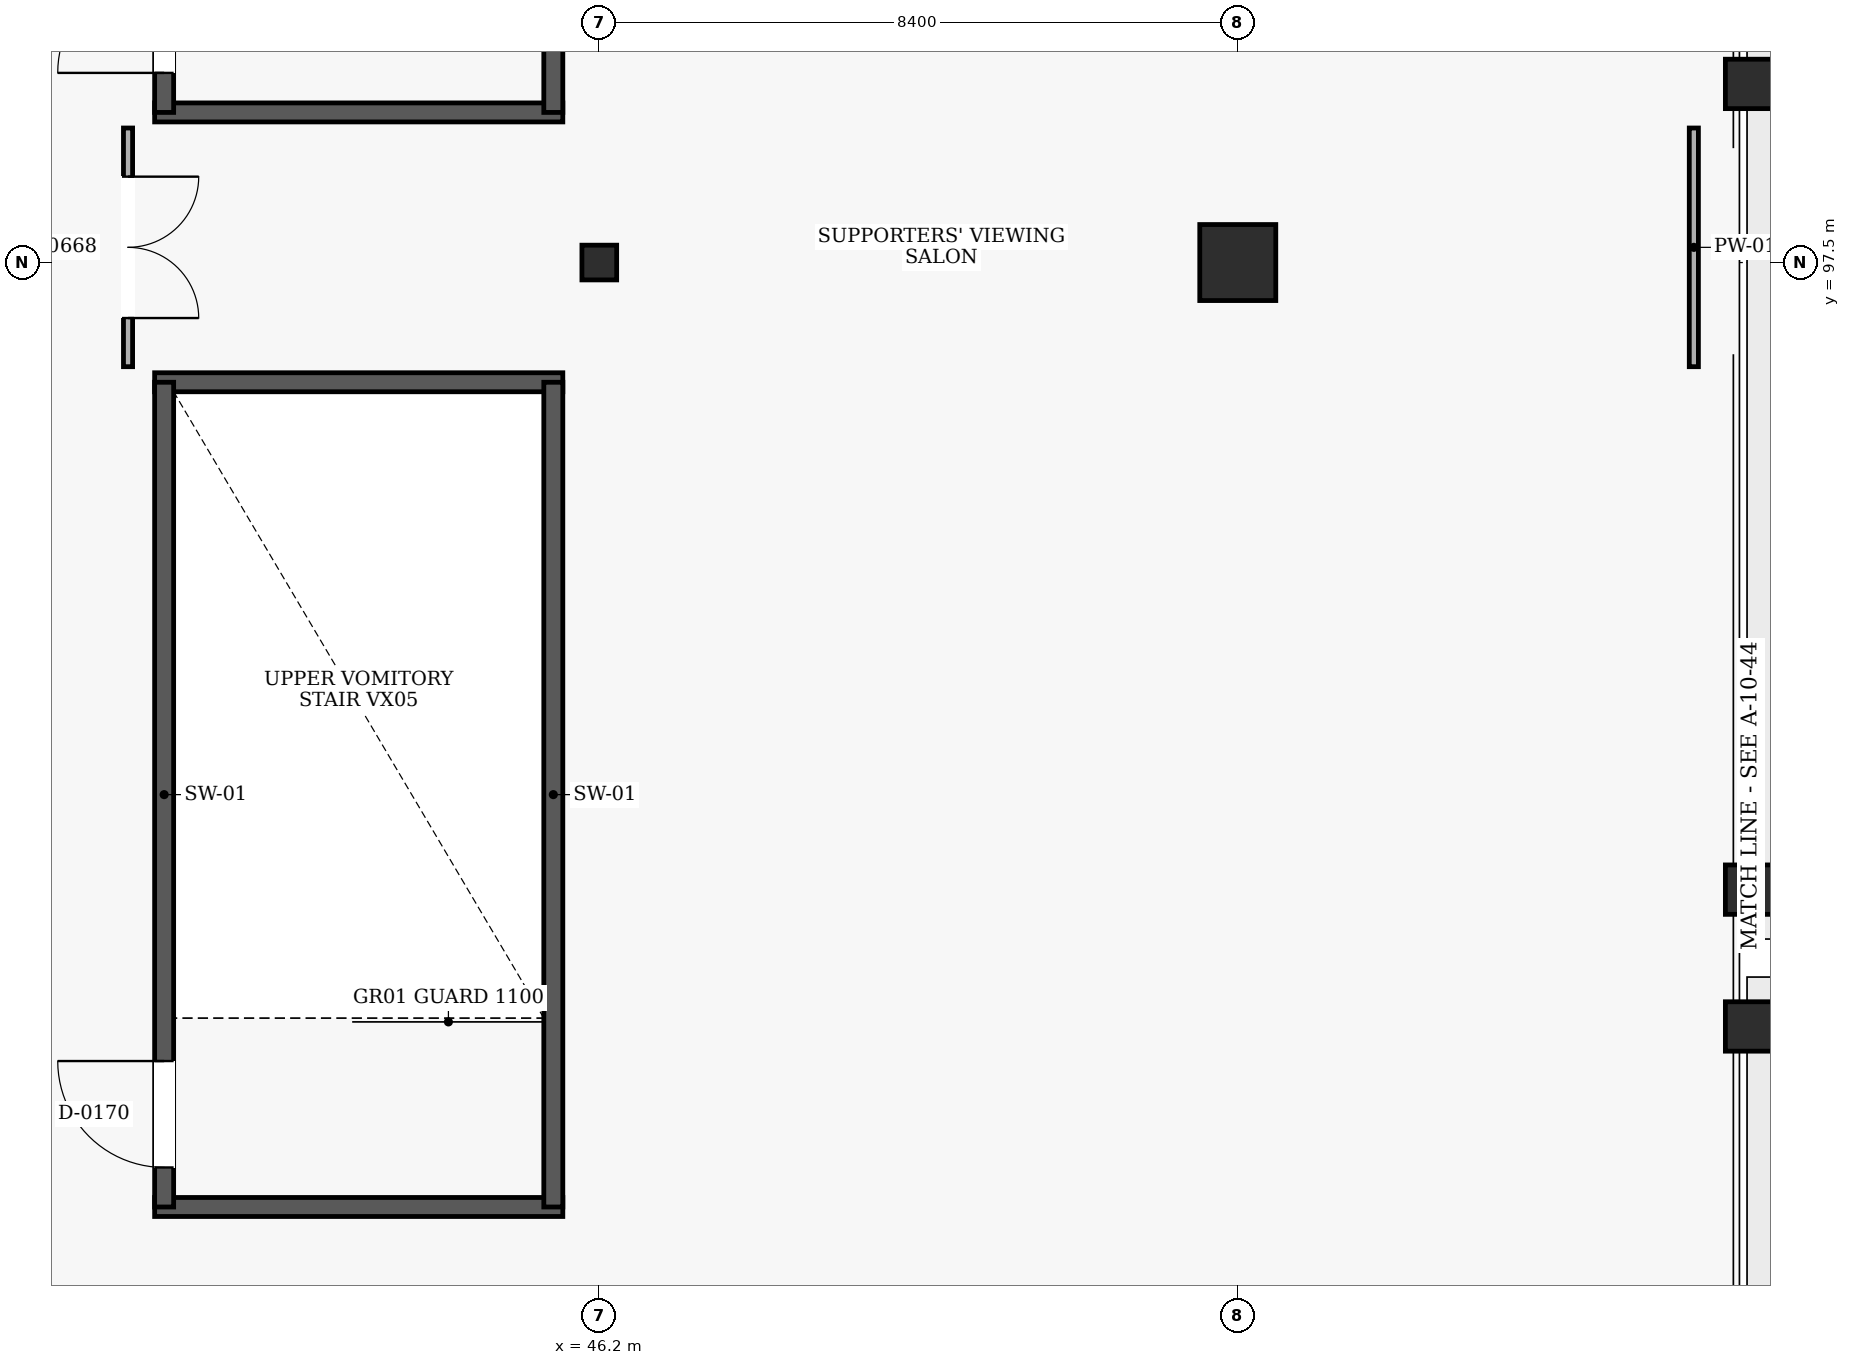
"""IFC4 building model, lengths in metres.
Left out: names, types, materials, properties, quantities, classifications, styles, units other than length and angle.
Written with IfcOpenShell. Run it as: python <this file> out.ifc"""

import sys

from ifc_helpers import new_model, si_unit, direction, frame, frame_2d, origin, origin_2d, place, context, subcontext, project, spatial, rectangle, hollow_circle, extrude, element, fill, save


model = new_model("IFC4")
c1 = context("Model", 3, precision=1e-05, world=origin(), true_north=direction((0.0, 1.0)))
c2 = subcontext(c1, "Body", "Model", "MODEL_VIEW")
j1 = project(units=[si_unit("LENGTHUNIT", "METRE"), si_unit("PLANEANGLEUNIT", "RADIAN")], contexts=[c1])
p1 = place(None, origin())
s1 = spatial("IfcSite", under=j1, at=p1, CompositionType="ELEMENT")
p2 = place(p1, origin())
s2 = spatial("IfcBuilding", under=s1, at=p2, CompositionType="ELEMENT")
p3 = place(p2, frame((0.0, 0.0, 15.0)))
s3 = spatial("IfcBuildingStorey", under=s2, at=p3, CompositionType="ELEMENT", Elevation=15.0)
p4 = place(p3, frame((46.2, 97.5, 0.0), z_axis=(0.0, 0.0, 1.0), x_axis=(1.0, 0.0, 0.0)))
e1 = element("IfcColumn", 1, at=p4, inside=s3, PredefinedType="COLUMN", context=c2, shape_type="SweptSolid", body=[
    extrude(hollow_circle(Radius=0.229, WallThickness=0.02, at=origin_2d()), origin(), (0.0, 0.0, 1.0), 4.8),
])
p5 = place(p3, frame((54.6, 97.5, 0.0), z_axis=(0.0, 0.0, 1.0), x_axis=(1.0, 0.0, 0.0)))
e2 = element("IfcColumn", 2, at=p5, inside=s3, PredefinedType="COLUMN", context=c2, shape_type="SweptSolid", body=[
    extrude(rectangle(XDim=1.0, YDim=1.0, at=origin_2d()), origin(), (0.0, 0.0, 1.0), 4.8),
])
for number, where, z_axis, x_axis in (
    (3, (61.34, 87.45, 0.0), (0.0, 0.0, 1.0), (1.0, 0.0, 0.0)),
    (4, (61.34, 89.25, 0.0), (0.0, 0.0, 1.0), (1.0, 0.0, 0.0)),
    (5, (61.34, 99.85, 0.0), (0.0, 0.0, 1.0), (1.0, 0.0, 0.0)),
):
    element("IfcColumn", number, at=place(p3, frame(where, z_axis=z_axis, x_axis=x_axis)), inside=s3, PredefinedType="COLUMN", context=c2, shape_type="SweptSolid", body=[
        extrude(rectangle(XDim=0.65, YDim=0.65, at=origin_2d()), origin(), (0.0, 0.0, 1.0), 2.188),
    ])
for number, where, z_axis, x_axis in (
    (6, (40.35, 85.075, 0.0), (0.0, 0.0, 1.0), (1.0, 0.0, 0.0)),
    (7, (45.72, 95.925, 0.0), (0.0, 0.0, 1.0), (-1.0, 0.0, 0.0)),
):
    element("IfcWall", number, at=place(p3, frame(where, z_axis=z_axis, x_axis=x_axis)), inside=s3, PredefinedType="SHEAR", context=c2, shape_type="SweptSolid", body=[
        extrude(rectangle(XDim=5.37, YDim=0.25, at=frame_2d((2.685, 0.0))), origin(), (0.0, 0.0, 1.0), 4.5),
    ])
p6 = place(p3, frame((40.475, 85.075, 0.0), z_axis=(0.0, 0.0, 1.0), x_axis=(0.0, 1.0, 0.0)))
e8 = element("IfcWall", 8, at=p6, inside=s3, PredefinedType="SHEAR", context=c2, shape_type="SweptSolid", body=[
    extrude(rectangle(XDim=10.85, YDim=0.25, at=frame_2d((5.425, 0.0))), origin(), (0.0, 0.0, 1.0), 4.5),
])
p7 = place(p6, frame((0.52, 0.0, 0.0)))
e9 = element("IfcOpeningElement", 9, at=p7, cuts=e8, PredefinedType="OPENING", context=c2, shape_type="SweptSolid", body=[
    extrude(rectangle(XDim=1.4, YDim=2.15, at=frame_2d((0.7, 1.075))), frame((0.0, 0.135, 0.0), z_axis=(0.0, -1.0, 0.0), x_axis=(1.0, 0.0, 0.0)), (0.0, 0.0, 1.0), 0.27),
])
p8 = place(p3, frame((45.595, 85.075, 0.0), z_axis=(0.0, 0.0, 1.0), x_axis=(0.0, 1.0, 0.0)))
e10 = element("IfcWall", 10, at=p8, inside=s3, PredefinedType="SHEAR", context=c2, shape_type="SweptSolid", body=[
    extrude(rectangle(XDim=10.85, YDim=0.25, at=frame_2d((5.425, 0.0))), origin(), (0.0, 0.0, 1.0), 4.5),
])
p9 = place(p3, frame((40.35, 99.475, 0.0), z_axis=(0.0, 0.0, 1.0), x_axis=(1.0, 0.0, 0.0)))
e11 = element("IfcWall", 11, at=p9, inside=s3, PredefinedType="SHEAR", context=c2, shape_type="SweptSolid", body=[
    extrude(rectangle(XDim=5.37, YDim=0.25, at=frame_2d((2.685, 0.0))), origin(), (0.0, 0.0, 1.0), 4.5),
])
p10 = place(p3, frame((40.475, 99.475, 0.0), z_axis=(0.0, 0.0, 1.0), x_axis=(0.0, 1.0, 0.0)))
e12 = element("IfcWall", 12, at=p10, inside=s3, PredefinedType="SHEAR", context=c2, shape_type="SweptSolid", body=[
    extrude(rectangle(XDim=10.85, YDim=0.25, at=frame_2d((5.425, 0.0))), origin(), (0.0, 0.0, 1.0), 4.5),
])
p11 = place(p10, frame((0.52, 0.0, 0.0)))
e13 = element("IfcOpeningElement", 13, at=p11, cuts=e12, PredefinedType="OPENING", context=c2, shape_type="SweptSolid", body=[
    extrude(rectangle(XDim=1.4, YDim=2.15, at=frame_2d((0.7, 1.075))), frame((0.0, 0.135, 0.0), z_axis=(0.0, -1.0, 0.0), x_axis=(1.0, 0.0, 0.0)), (0.0, 0.0, 1.0), 0.27),
])
p12 = place(p3, frame((45.595, 99.475, 0.0), z_axis=(0.0, 0.0, 1.0), x_axis=(0.0, 1.0, 0.0)))
e14 = element("IfcWall", 14, at=p12, inside=s3, PredefinedType="SHEAR", context=c2, shape_type="SweptSolid", body=[
    extrude(rectangle(XDim=10.85, YDim=0.25, at=frame_2d((5.425, 0.0))), origin(), (0.0, 0.0, 1.0), 4.5),
])
p13 = place(p3, frame((60.6, 96.13, 0.0), z_axis=(0.0, 0.0, 1.0), x_axis=(0.0, 1.0, 0.0)))
e15 = element("IfcWall", 15, at=p13, inside=s3, PredefinedType="PARTITIONING", context=c2, shape_type="SweptSolid", body=[
    extrude(rectangle(XDim=3.14, YDim=0.12, at=frame_2d((1.57, 0.0))), origin(), (0.0, 0.0, 1.0), 4.5),
])
p14 = place(p3, frame((40.0, 99.27, 0.0), z_axis=(0.0, 0.0, 1.0), x_axis=(0.0, -1.0, 0.0)))
e16 = element("IfcWall", 16, at=p14, inside=s3, PredefinedType="PARTITIONING", context=c2, shape_type="SweptSolid", body=[
    extrude(rectangle(XDim=3.14, YDim=0.12, at=frame_2d((1.57, 0.0))), origin(), (0.0, 0.0, 1.0), 4.5),
])
p15 = place(p14, frame((0.64, 0.0, 0.0)))
e17 = element("IfcOpeningElement", 17, at=p15, cuts=e16, PredefinedType="OPENING", context=c2, shape_type="SweptSolid", body=[
    extrude(rectangle(XDim=1.86, YDim=2.3, at=frame_2d((0.93, 1.15))), frame((0.0, 0.07, 0.0), z_axis=(0.0, -1.0, 0.0), x_axis=(1.0, 0.0, 0.0)), (0.0, 0.0, 1.0), 0.14),
])
p16 = place(p7, frame((1.4, 0.0, 0.0), z_axis=(0.0, 0.0, 1.0), x_axis=(-1.0, 0.0, 0.0)))
e18 = element("IfcDoor", 18, at=p16, inside=s3, OperationType="SINGLE_SWING_LEFT", PredefinedType="DOOR", context=c2, shape_type="SweptSolid", body=[
    extrude(rectangle(XDim=1.4, YDim=2.15, at=frame_2d((0.7, 1.075))), frame((0.0, 0.025, 0.0), z_axis=(0.0, -1.0, 0.0), x_axis=(1.0, 0.0, 0.0)), (0.0, 0.0, 1.0), 0.05),
])
fill(e9, e18)
p17 = place(p11, frame((1.4, 0.0, 0.0), z_axis=(0.0, 0.0, 1.0), x_axis=(-1.0, 0.0, 0.0)))
e19 = element("IfcDoor", 19, at=p17, inside=s3, OperationType="SINGLE_SWING_RIGHT", PredefinedType="DOOR", context=c2, shape_type="SweptSolid", body=[
    extrude(rectangle(XDim=1.4, YDim=2.15, at=frame_2d((0.7, 1.075))), frame((0.0, 0.025, 0.0), z_axis=(0.0, -1.0, 0.0), x_axis=(1.0, 0.0, 0.0)), (0.0, 0.0, 1.0), 0.05),
])
fill(e13, e19)
p18 = place(p15, origin())
e20 = element("IfcDoor", 20, at=p18, inside=s3, OperationType="DOUBLE_DOOR_SINGLE_SWING", PredefinedType="DOOR", context=c2, shape_type="SweptSolid", body=[
    extrude(rectangle(XDim=1.86, YDim=2.3, at=frame_2d((0.93, 1.15))), frame((0.0, 0.025, 0.0), z_axis=(0.0, -1.0, 0.0), x_axis=(1.0, 0.0, 0.0)), (0.0, 0.0, 1.0), 0.05),
])
fill(e17, e20)
save(model, sys.argv[1])
